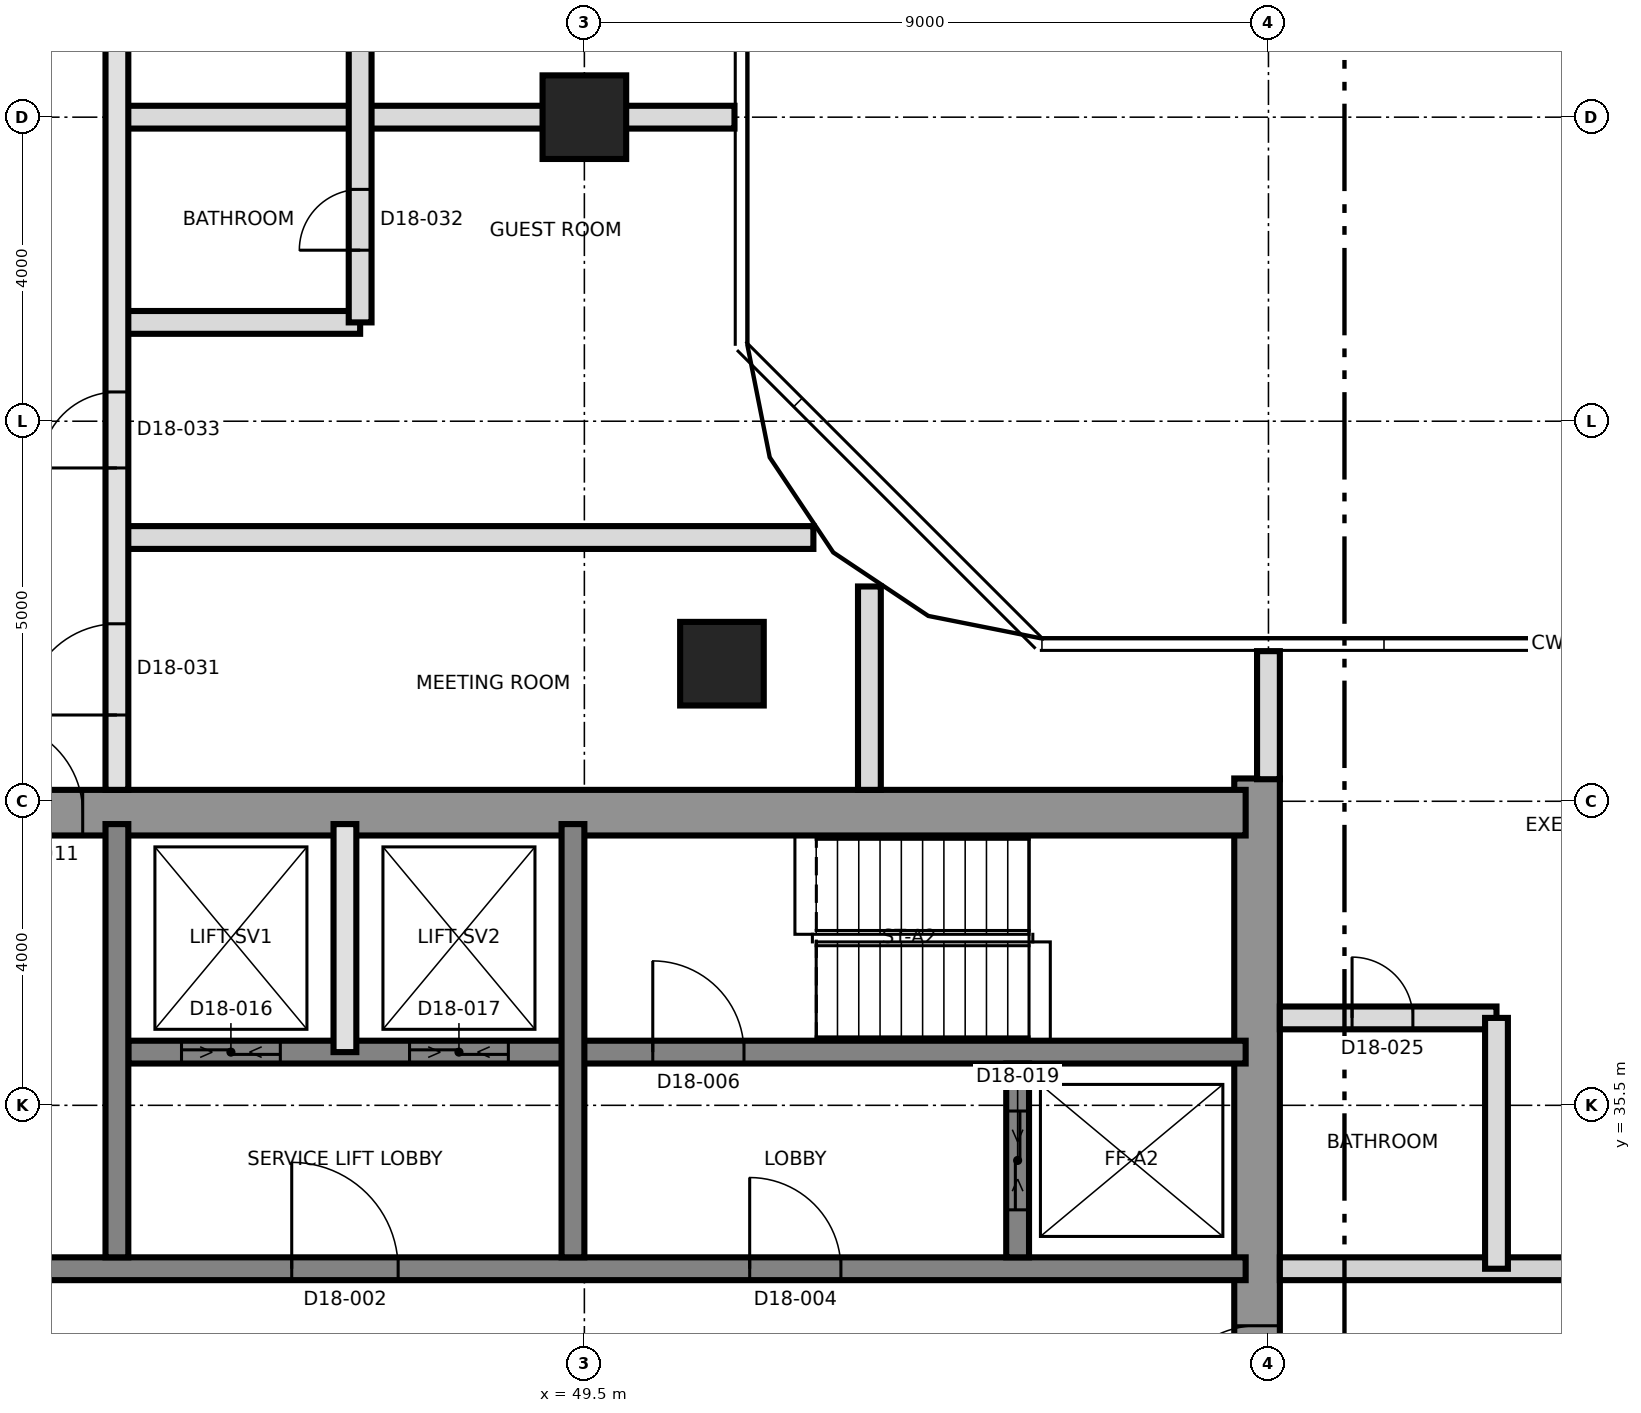
"""IFC4 building model, lengths in metres.
Left out: names, types, materials, properties, quantities, classifications, styles, units other than length and angle.
Written with IfcOpenShell. Run it as: python <this file> out.ifc"""

import sys

from ifc_helpers import new_model, si_unit, direction, frame, frame_2d, origin, origin_2d, place, context, subcontext, project, spatial, rectangle, extrude, element, fill, save


model = new_model("IFC4")
c1 = context("Model", 3, precision=1e-05, world=origin(), true_north=direction((0.0, 1.0)))
c2 = subcontext(c1, "Body", "Model", "MODEL_VIEW")
j1 = project(units=[si_unit("LENGTHUNIT", "METRE"), si_unit("PLANEANGLEUNIT", "RADIAN")], contexts=[c1])
p1 = place(None, origin())
s1 = spatial("IfcSite", under=j1, at=p1, CompositionType="ELEMENT")
p2 = place(p1, origin())
s2 = spatial("IfcBuilding", under=s1, at=p2, CompositionType="ELEMENT")
p3 = place(p2, frame((0.0, 0.0, 175.5)))
s3 = spatial("IfcBuildingStorey", under=s2, at=p3, CompositionType="ELEMENT", Elevation=175.5)
p4 = place(p3, frame((58.35, 21.2, 0.0), z_axis=(0.0, 0.0, 1.0), x_axis=(0.0, 1.0, 0.0)))
e1 = element("IfcWall", 1, at=p4, inside=s3, PredefinedType="SHEAR", context=c2, shape_type="SweptSolid", body=[
    extrude(rectangle(XDim=18.6, YDim=0.6, at=frame_2d((9.3, 0.0))), origin(), (0.0, 0.0, 1.0), 3.7),
])
p5 = place(p4, frame((10.2, 0.0, 0.0)))
e2 = element("IfcOpeningElement", 2, at=p5, cuts=e1, PredefinedType="OPENING", context=c2, shape_type="SweptSolid", body=[
    extrude(rectangle(XDim=1.2, YDim=2.1, at=frame_2d((0.6, 1.05))), frame((0.0, 0.31, 0.0), z_axis=(0.0, -1.0, 0.0), x_axis=(1.0, 0.0, 0.0)), (0.0, 0.0, 1.0), 0.62),
])
p6 = place(p3, frame((31.2, 39.35, 0.0), z_axis=(0.0, 0.0, 1.0), x_axis=(1.0, 0.0, 0.0)))
e3 = element("IfcWall", 3, at=p6, inside=s3, PredefinedType="SHEAR", context=c2, shape_type="SweptSolid", body=[
    extrude(rectangle(XDim=27.0, YDim=0.6, at=frame_2d((13.5, 0.0))), origin(), (0.0, 0.0, 1.0), 3.7),
])
p7 = place(p6, frame((10.5, 0.0, 0.0)))
e4 = element("IfcOpeningElement", 4, at=p7, cuts=e3, PredefinedType="OPENING", context=c2, shape_type="SweptSolid", body=[
    extrude(rectangle(XDim=1.2, YDim=2.1, at=frame_2d((0.6, 1.05))), frame((0.0, 0.31, 0.0), z_axis=(0.0, -1.0, 0.0), x_axis=(1.0, 0.0, 0.0)), (0.0, 0.0, 1.0), 0.62),
])
p8 = place(p3, frame((31.8, 33.35, 0.0), z_axis=(0.0, 0.0, 1.0), x_axis=(1.0, 0.0, 0.0)))
e5 = element("IfcWall", 5, at=p8, inside=s3, PredefinedType="SHEAR", context=c2, shape_type="SweptSolid", body=[
    extrude(rectangle(XDim=26.4, YDim=0.3, at=frame_2d((13.2, 0.0))), origin(), (0.0, 0.0, 1.0), 3.7),
])
p9 = place(p8, frame((13.85, 0.0, 0.0)))
e6 = element("IfcOpeningElement", 6, at=p9, cuts=e5, PredefinedType="OPENING", context=c2, shape_type="SweptSolid", body=[
    extrude(rectangle(XDim=1.4, YDim=2.1, at=frame_2d((0.7, 1.05))), frame((0.0, 0.16, 0.0), z_axis=(0.0, -1.0, 0.0), x_axis=(1.0, 0.0, 0.0)), (0.0, 0.0, 1.0), 0.32),
])
p10 = place(p8, frame((5.325, 0.0, 0.0)))
e7 = element("IfcOpeningElement", 7, at=p10, cuts=e5, PredefinedType="OPENING", context=c2, shape_type="SweptSolid", body=[
    extrude(rectangle(XDim=1.2, YDim=2.1, at=frame_2d((0.6, 1.05))), frame((0.0, 0.16, 0.0), z_axis=(0.0, -1.0, 0.0), x_axis=(1.0, 0.0, 0.0)), (0.0, 0.0, 1.0), 0.32),
])
p11 = place(p8, frame((19.875, 0.0, 0.0)))
e8 = element("IfcOpeningElement", 8, at=p11, cuts=e5, PredefinedType="OPENING", context=c2, shape_type="SweptSolid", body=[
    extrude(rectangle(XDim=1.2, YDim=2.1, at=frame_2d((0.6, 1.05))), frame((0.0, 0.16, 0.0), z_axis=(0.0, -1.0, 0.0), x_axis=(1.0, 0.0, 0.0)), (0.0, 0.0, 1.0), 0.32),
])
p12 = place(p3, frame((43.5, 36.2, 0.0), z_axis=(0.0, 0.0, 1.0), x_axis=(1.0, 0.0, 0.0)))
e9 = element("IfcWall", 9, at=p12, inside=s3, PredefinedType="SHEAR", context=c2, shape_type="SweptSolid", body=[
    extrude(rectangle(XDim=14.7, YDim=0.3, at=frame_2d((7.35, 0.0))), origin(), (0.0, 0.0, 1.0), 3.7),
])
p13 = place(p12, frame((6.9, 0.0, 0.0)))
e10 = element("IfcOpeningElement", 10, at=p13, cuts=e9, PredefinedType="OPENING", context=c2, shape_type="SweptSolid", body=[
    extrude(rectangle(XDim=1.2, YDim=2.1, at=frame_2d((0.6, 1.05))), frame((0.0, 0.16, 0.0), z_axis=(0.0, -1.0, 0.0), x_axis=(1.0, 0.0, 0.0)), (0.0, 0.0, 1.0), 0.32),
])
p14 = place(p12, frame((0.7, 0.0, 0.0)))
e11 = element("IfcOpeningElement", 11, at=p14, cuts=e9, PredefinedType="OPENING", context=c2, shape_type="SweptSolid", body=[
    extrude(rectangle(XDim=1.3, YDim=2.4, at=frame_2d((0.65, 1.2))), frame((0.0, 0.16, 0.0), z_axis=(0.0, -1.0, 0.0), x_axis=(1.0, 0.0, 0.0)), (0.0, 0.0, 1.0), 0.32),
])
p15 = place(p12, frame((3.7, 0.0, 0.0)))
e12 = element("IfcOpeningElement", 12, at=p15, cuts=e9, PredefinedType="OPENING", context=c2, shape_type="SweptSolid", body=[
    extrude(rectangle(XDim=1.3, YDim=2.4, at=frame_2d((0.65, 1.2))), frame((0.0, 0.16, 0.0), z_axis=(0.0, -1.0, 0.0), x_axis=(1.0, 0.0, 0.0)), (0.0, 0.0, 1.0), 0.32),
])
for number, where, z_axis, x_axis in (
    (13, (43.35, 33.5, 0.0), (0.0, 0.0, 1.0), (0.0, 1.0, 0.0)),
    (14, (49.35, 33.5, 0.0), (0.0, 0.0, 1.0), (0.0, 1.0, 0.0)),
):
    element("IfcWall", number, at=place(p3, frame(where, z_axis=z_axis, x_axis=x_axis)), inside=s3, PredefinedType="SHEAR", context=c2, shape_type="SweptSolid", body=[
        extrude(rectangle(XDim=5.7, YDim=0.3, at=frame_2d((2.85, 0.0))), origin(), (0.0, 0.0, 1.0), 3.7),
    ])
p16 = place(p3, frame((55.2, 33.5, 0.0), z_axis=(0.0, 0.0, 1.0), x_axis=(0.0, 1.0, 0.0)))
e15 = element("IfcWall", 15, at=p16, inside=s3, PredefinedType="SHEAR", context=c2, shape_type="SweptSolid", body=[
    extrude(rectangle(XDim=2.55, YDim=0.3, at=frame_2d((1.275, 0.0))), origin(), (0.0, 0.0, 1.0), 3.7),
])
p17 = place(p16, frame((0.625, 0.0, 0.0)))
e16 = element("IfcOpeningElement", 16, at=p17, cuts=e15, PredefinedType="OPENING", context=c2, shape_type="SweptSolid", body=[
    extrude(rectangle(XDim=1.3, YDim=2.4, at=frame_2d((0.65, 1.2))), frame((0.0, 0.16, 0.0), z_axis=(0.0, -1.0, 0.0), x_axis=(1.0, 0.0, 0.0)), (0.0, 0.0, 1.0), 0.32),
])
for number, where, z_axis, x_axis in (
    (17, (51.31, 41.31, 0.0), (0.0, 0.0, 1.0), (1.0, 0.0, 0.0)),
    (18, (49.5, 48.5, 0.0), (0.0, 0.0, 1.0), (1.0, 0.0, 0.0)),
):
    element("IfcColumn", number, at=place(p3, frame(where, z_axis=z_axis, x_axis=x_axis)), inside=s3, PredefinedType="COLUMN", context=c2, shape_type="SweptSolid", body=[
        extrude(rectangle(XDim=1.1, YDim=1.1, at=origin_2d()), origin(), (0.0, 0.0, 1.0), 3.7),
    ])
p18 = place(p3, frame((46.35, 36.2, 0.0), z_axis=(0.0, 0.0, 1.0), x_axis=(0.0, 1.0, 0.0)))
e19 = element("IfcWall", 19, at=p18, inside=s3, PredefinedType="SOLIDWALL", context=c2, shape_type="SweptSolid", body=[
    extrude(rectangle(XDim=3.0, YDim=0.3, at=frame_2d((1.5, 0.0))), origin(), (0.0, 0.0, 1.0), 3.4),
])
p19 = place(p3, frame((58.65, 33.35, 0.0), z_axis=(0.0, 0.0, 1.0), x_axis=(1.0, 0.0, 0.0)))
e20 = element("IfcWall", 20, at=p19, inside=s3, PredefinedType="PARTITIONING", context=c2, shape_type="SweptSolid", body=[
    extrude(rectangle(XDim=10.28, YDim=0.3, at=frame_2d((5.14, 0.0))), origin(), (0.0, 0.0, 1.0), 3.4),
])
p20 = place(p19, frame((3.85, 0.0, 0.0)))
e21 = element("IfcOpeningElement", 21, at=p20, cuts=e20, PredefinedType="OPENING", context=c2, shape_type="SweptSolid", body=[
    extrude(rectangle(XDim=1.0, YDim=2.4, at=frame_2d((0.5, 1.2))), frame((0.0, 0.16, 0.0), z_axis=(0.0, -1.0, 0.0), x_axis=(1.0, 0.0, 0.0)), (0.0, 0.0, 1.0), 0.32),
])
p21 = place(p3, frame((58.65, 36.65, 0.0), z_axis=(0.0, 0.0, 1.0), x_axis=(1.0, 0.0, 0.0)))
e22 = element("IfcWall", 22, at=p21, inside=s3, PredefinedType="PARTITIONING", context=c2, shape_type="SweptSolid", body=[
    extrude(rectangle(XDim=2.85, YDim=0.3, at=frame_2d((1.425, 0.0))), origin(), (0.0, 0.0, 1.0), 3.4),
])
p22 = place(p21, frame((0.95, 0.0, 0.0)))
e23 = element("IfcOpeningElement", 23, at=p22, cuts=e22, PredefinedType="OPENING", context=c2, shape_type="SweptSolid", body=[
    extrude(rectangle(XDim=0.8, YDim=2.1, at=frame_2d((0.4, 1.05))), frame((0.0, 0.16, 0.0), z_axis=(0.0, -1.0, 0.0), x_axis=(1.0, 0.0, 0.0)), (0.0, 0.0, 1.0), 0.32),
])
p23 = place(p3, frame((43.35, 42.97, 0.0), z_axis=(0.0, 0.0, 1.0), x_axis=(1.0, 0.0, 0.0)))
e24 = element("IfcWall", 24, at=p23, inside=s3, PredefinedType="PARTITIONING", context=c2, shape_type="SweptSolid", body=[
    extrude(rectangle(XDim=9.163, YDim=0.3, at=frame_2d((4.582, 0.0))), origin(), (0.0, 0.0, 1.0), 3.4),
])
p24 = place(p3, frame((43.35, 45.8, 0.0), z_axis=(0.0, 0.0, 1.0), x_axis=(1.0, 0.0, 0.0)))
e25 = element("IfcWall", 25, at=p24, inside=s3, PredefinedType="PARTITIONING", context=c2, shape_type="SweptSolid", body=[
    extrude(rectangle(XDim=3.2, YDim=0.3, at=frame_2d((1.6, 0.0))), origin(), (0.0, 0.0, 1.0), 3.4),
])
p25 = place(p3, frame((43.35, 48.5, 0.0), z_axis=(0.0, 0.0, 1.0), x_axis=(1.0, 0.0, 0.0)))
e26 = element("IfcWall", 26, at=p25, inside=s3, PredefinedType="PARTITIONING", context=c2, shape_type="SweptSolid", body=[
    extrude(rectangle(XDim=8.125, YDim=0.3, at=frame_2d((4.062, 0.0))), origin(), (0.0, 0.0, 1.0), 3.4),
])
p26 = place(p3, frame((43.35, 39.65, 0.0), z_axis=(0.0, 0.0, 1.0), x_axis=(0.0, 1.0, 0.0)))
e27 = element("IfcWall", 27, at=p26, inside=s3, PredefinedType="SOLIDWALL", context=c2, shape_type="SweptSolid", body=[
    extrude(rectangle(XDim=26.1, YDim=0.3, at=frame_2d((13.05, 0.0))), origin(), (0.0, 0.0, 1.0), 3.4),
])
p27 = place(p26, frame((0.985, 0.0, 0.0)))
e28 = element("IfcOpeningElement", 28, at=p27, cuts=e27, PredefinedType="OPENING", context=c2, shape_type="SweptSolid", body=[
    extrude(rectangle(XDim=1.2, YDim=2.1, at=frame_2d((0.6, 1.05))), frame((0.0, 0.16, 0.0), z_axis=(0.0, -1.0, 0.0), x_axis=(1.0, 0.0, 0.0)), (0.0, 0.0, 1.0), 0.32),
])
p28 = place(p26, frame((4.235, 0.0, 0.0)))
e29 = element("IfcOpeningElement", 29, at=p28, cuts=e27, PredefinedType="OPENING", context=c2, shape_type="SweptSolid", body=[
    extrude(rectangle(XDim=1.0, YDim=2.1, at=frame_2d((0.5, 1.05))), frame((0.0, 0.16, 0.0), z_axis=(0.0, -1.0, 0.0), x_axis=(1.0, 0.0, 0.0)), (0.0, 0.0, 1.0), 0.32),
])
p29 = place(p26, frame((12.265, 0.0, 0.0)))
e30 = element("IfcOpeningElement", 30, at=p29, cuts=e27, PredefinedType="OPENING", context=c2, shape_type="SweptSolid", body=[
    extrude(rectangle(XDim=1.0, YDim=2.1, at=frame_2d((0.5, 1.05))), frame((0.0, 0.16, 0.0), z_axis=(0.0, -1.0, 0.0), x_axis=(1.0, 0.0, 0.0)), (0.0, 0.0, 1.0), 0.32),
])
p30 = place(p26, frame((15.215, 0.0, 0.0)))
e31 = element("IfcOpeningElement", 31, at=p30, cuts=e27, PredefinedType="OPENING", context=c2, shape_type="SweptSolid", body=[
    extrude(rectangle(XDim=1.4, YDim=2.1, at=frame_2d((0.7, 1.05))), frame((0.0, 0.16, 0.0), z_axis=(0.0, -1.0, 0.0), x_axis=(1.0, 0.0, 0.0)), (0.0, 0.0, 1.0), 0.32),
])
p31 = place(p26, frame((19.85, 0.0, 0.0)))
e32 = element("IfcOpeningElement", 32, at=p31, cuts=e27, PredefinedType="OPENING", context=c2, shape_type="SweptSolid", body=[
    extrude(rectangle(XDim=1.0, YDim=2.4, at=frame_2d((0.5, 1.2))), frame((0.0, 0.16, 0.0), z_axis=(0.0, -1.0, 0.0), x_axis=(1.0, 0.0, 0.0)), (0.0, 0.0, 1.0), 0.32),
])
p32 = place(p3, frame((46.55, 45.8, 0.0), z_axis=(0.0, 0.0, 1.0), x_axis=(0.0, 1.0, 0.0)))
e33 = element("IfcWall", 33, at=p32, inside=s3, PredefinedType="PARTITIONING", context=c2, shape_type="SweptSolid", body=[
    extrude(rectangle(XDim=5.4, YDim=0.3, at=frame_2d((2.7, 0.0))), origin(), (0.0, 0.0, 1.0), 3.4),
])
p33 = place(p32, frame((0.95, 0.0, 0.0)))
e34 = element("IfcOpeningElement", 34, at=p33, cuts=e33, PredefinedType="OPENING", context=c2, shape_type="SweptSolid", body=[
    extrude(rectangle(XDim=0.8, YDim=2.1, at=frame_2d((0.4, 1.05))), frame((0.0, 0.16, 0.0), z_axis=(0.0, -1.0, 0.0), x_axis=(1.0, 0.0, 0.0)), (0.0, 0.0, 1.0), 0.32),
])
p34 = place(p32, frame((3.65, 0.0, 0.0)))
e35 = element("IfcOpeningElement", 35, at=p34, cuts=e33, PredefinedType="OPENING", context=c2, shape_type="SweptSolid", body=[
    extrude(rectangle(XDim=0.8, YDim=2.1, at=frame_2d((0.4, 1.05))), frame((0.0, 0.16, 0.0), z_axis=(0.0, -1.0, 0.0), x_axis=(1.0, 0.0, 0.0)), (0.0, 0.0, 1.0), 0.32),
])
p35 = place(p3, frame((53.25, 39.65, 0.0), z_axis=(0.0, 0.0, 1.0), x_axis=(0.0, 1.0, 0.0)))
e36 = element("IfcWall", 36, at=p35, inside=s3, PredefinedType="PARTITIONING", context=c2, shape_type="SweptSolid", body=[
    extrude(rectangle(XDim=2.676, YDim=0.3, at=frame_2d((1.338, 0.0))), origin(), (0.0, 0.0, 1.0), 3.4),
])
p36 = place(p3, frame((58.5, 39.79, 0.0), z_axis=(0.0, 0.0, 1.0), x_axis=(0.0, 1.0, 0.0)))
e37 = element("IfcWall", 37, at=p36, inside=s3, PredefinedType="PARTITIONING", context=c2, shape_type="SweptSolid", body=[
    extrude(rectangle(XDim=1.685, YDim=0.3, at=frame_2d((0.843, 0.0))), origin(), (0.0, 0.0, 1.0), 3.4),
])
p37 = place(p3, frame((61.5, 33.35, 0.0), z_axis=(0.0, 0.0, 1.0), x_axis=(0.0, 1.0, 0.0)))
e38 = element("IfcWall", 38, at=p37, inside=s3, PredefinedType="PARTITIONING", context=c2, shape_type="SweptSolid", body=[
    extrude(rectangle(XDim=3.3, YDim=0.3, at=frame_2d((1.65, 0.0))), origin(), (0.0, 0.0, 1.0), 3.4),
])
p38 = place(p9, origin())
e39 = element("IfcDoor", 39, at=p38, inside=s3, OperationType="SINGLE_SWING_RIGHT", PredefinedType="DOOR", context=c2, shape_type="SweptSolid", body=[
    extrude(rectangle(XDim=1.4, YDim=2.1, at=frame_2d((0.7, 1.05))), frame((0.0, 0.025, 0.0), z_axis=(0.0, -1.0, 0.0), x_axis=(1.0, 0.0, 0.0)), (0.0, 0.0, 1.0), 0.05),
])
fill(e6, e39)
p39 = place(p11, origin())
e40 = element("IfcDoor", 40, at=p39, inside=s3, OperationType="SINGLE_SWING_RIGHT", PredefinedType="DOOR", context=c2, shape_type="SweptSolid", body=[
    extrude(rectangle(XDim=1.2, YDim=2.1, at=frame_2d((0.6, 1.05))), frame((0.0, 0.025, 0.0), z_axis=(0.0, -1.0, 0.0), x_axis=(1.0, 0.0, 0.0)), (0.0, 0.0, 1.0), 0.05),
])
fill(e8, e40)
p40 = place(p13, origin())
e41 = element("IfcDoor", 41, at=p40, inside=s3, OperationType="SINGLE_SWING_LEFT", PredefinedType="DOOR", context=c2, shape_type="SweptSolid", body=[
    extrude(rectangle(XDim=1.2, YDim=2.1, at=frame_2d((0.6, 1.05))), frame((0.0, 0.025, 0.0), z_axis=(0.0, -1.0, 0.0), x_axis=(1.0, 0.0, 0.0)), (0.0, 0.0, 1.0), 0.05),
])
fill(e10, e41)
p41 = place(p5, origin())
e42 = element("IfcDoor", 42, at=p41, inside=s3, OperationType="SINGLE_SWING_LEFT", PredefinedType="DOOR", context=c2, shape_type="SweptSolid", body=[
    extrude(rectangle(XDim=1.2, YDim=2.1, at=frame_2d((0.6, 1.05))), frame((0.0, 0.025, 0.0), z_axis=(0.0, -1.0, 0.0), x_axis=(1.0, 0.0, 0.0)), (0.0, 0.0, 1.0), 0.05),
])
fill(e2, e42)
p42 = place(p7, origin())
e43 = element("IfcDoor", 43, at=p42, inside=s3, OperationType="SINGLE_SWING_RIGHT", PredefinedType="DOOR", context=c2, shape_type="SweptSolid", body=[
    extrude(rectangle(XDim=1.2, YDim=2.1, at=frame_2d((0.6, 1.05))), frame((0.0, 0.025, 0.0), z_axis=(0.0, -1.0, 0.0), x_axis=(1.0, 0.0, 0.0)), (0.0, 0.0, 1.0), 0.05),
])
fill(e4, e43)
p43 = place(p14, origin())
e44 = element("IfcDoor", 44, at=p43, inside=s3, OperationType="SLIDING_TO_LEFT", PredefinedType="DOOR", context=c2, shape_type="SweptSolid", body=[
    extrude(rectangle(XDim=1.3, YDim=2.4, at=frame_2d((0.65, 1.2))), frame((0.0, 0.025, 0.0), z_axis=(0.0, -1.0, 0.0), x_axis=(1.0, 0.0, 0.0)), (0.0, 0.0, 1.0), 0.05),
])
fill(e11, e44)
p44 = place(p15, origin())
e45 = element("IfcDoor", 45, at=p44, inside=s3, OperationType="SLIDING_TO_LEFT", PredefinedType="DOOR", context=c2, shape_type="SweptSolid", body=[
    extrude(rectangle(XDim=1.3, YDim=2.4, at=frame_2d((0.65, 1.2))), frame((0.0, 0.025, 0.0), z_axis=(0.0, -1.0, 0.0), x_axis=(1.0, 0.0, 0.0)), (0.0, 0.0, 1.0), 0.05),
])
fill(e12, e45)
p45 = place(p17, origin())
e46 = element("IfcDoor", 46, at=p45, inside=s3, OperationType="SLIDING_TO_LEFT", PredefinedType="DOOR", context=c2, shape_type="SweptSolid", body=[
    extrude(rectangle(XDim=1.3, YDim=2.4, at=frame_2d((0.65, 1.2))), frame((0.0, 0.025, 0.0), z_axis=(0.0, -1.0, 0.0), x_axis=(1.0, 0.0, 0.0)), (0.0, 0.0, 1.0), 0.05),
])
fill(e16, e46)
p46 = place(p22, origin())
e47 = element("IfcDoor", 47, at=p46, inside=s3, OperationType="SINGLE_SWING_LEFT", PredefinedType="DOOR", context=c2, shape_type="SweptSolid", body=[
    extrude(rectangle(XDim=0.8, YDim=2.1, at=frame_2d((0.4, 1.05))), frame((0.0, 0.025, 0.0), z_axis=(0.0, -1.0, 0.0), x_axis=(1.0, 0.0, 0.0)), (0.0, 0.0, 1.0), 0.05),
])
fill(e23, e47)
p47 = place(p27, origin())
e48 = element("IfcDoor", 48, at=p47, inside=s3, OperationType="SINGLE_SWING_LEFT", PredefinedType="DOOR", context=c2, shape_type="SweptSolid", body=[
    extrude(rectangle(XDim=1.2, YDim=2.1, at=frame_2d((0.6, 1.05))), frame((0.0, 0.025, 0.0), z_axis=(0.0, -1.0, 0.0), x_axis=(1.0, 0.0, 0.0)), (0.0, 0.0, 1.0), 0.05),
])
fill(e28, e48)
p48 = place(p33, origin())
e49 = element("IfcDoor", 49, at=p48, inside=s3, OperationType="SINGLE_SWING_LEFT", PredefinedType="DOOR", context=c2, shape_type="SweptSolid", body=[
    extrude(rectangle(XDim=0.8, YDim=2.1, at=frame_2d((0.4, 1.05))), frame((0.0, 0.025, 0.0), z_axis=(0.0, -1.0, 0.0), x_axis=(1.0, 0.0, 0.0)), (0.0, 0.0, 1.0), 0.05),
])
fill(e34, e49)
p49 = place(p28, origin())
e50 = element("IfcDoor", 50, at=p49, inside=s3, OperationType="SINGLE_SWING_RIGHT", PredefinedType="DOOR", context=c2, shape_type="SweptSolid", body=[
    extrude(rectangle(XDim=1.0, YDim=2.1, at=frame_2d((0.5, 1.05))), frame((0.0, 0.025, 0.0), z_axis=(0.0, -1.0, 0.0), x_axis=(1.0, 0.0, 0.0)), (0.0, 0.0, 1.0), 0.05),
])
fill(e29, e50)
save(model, sys.argv[1])
